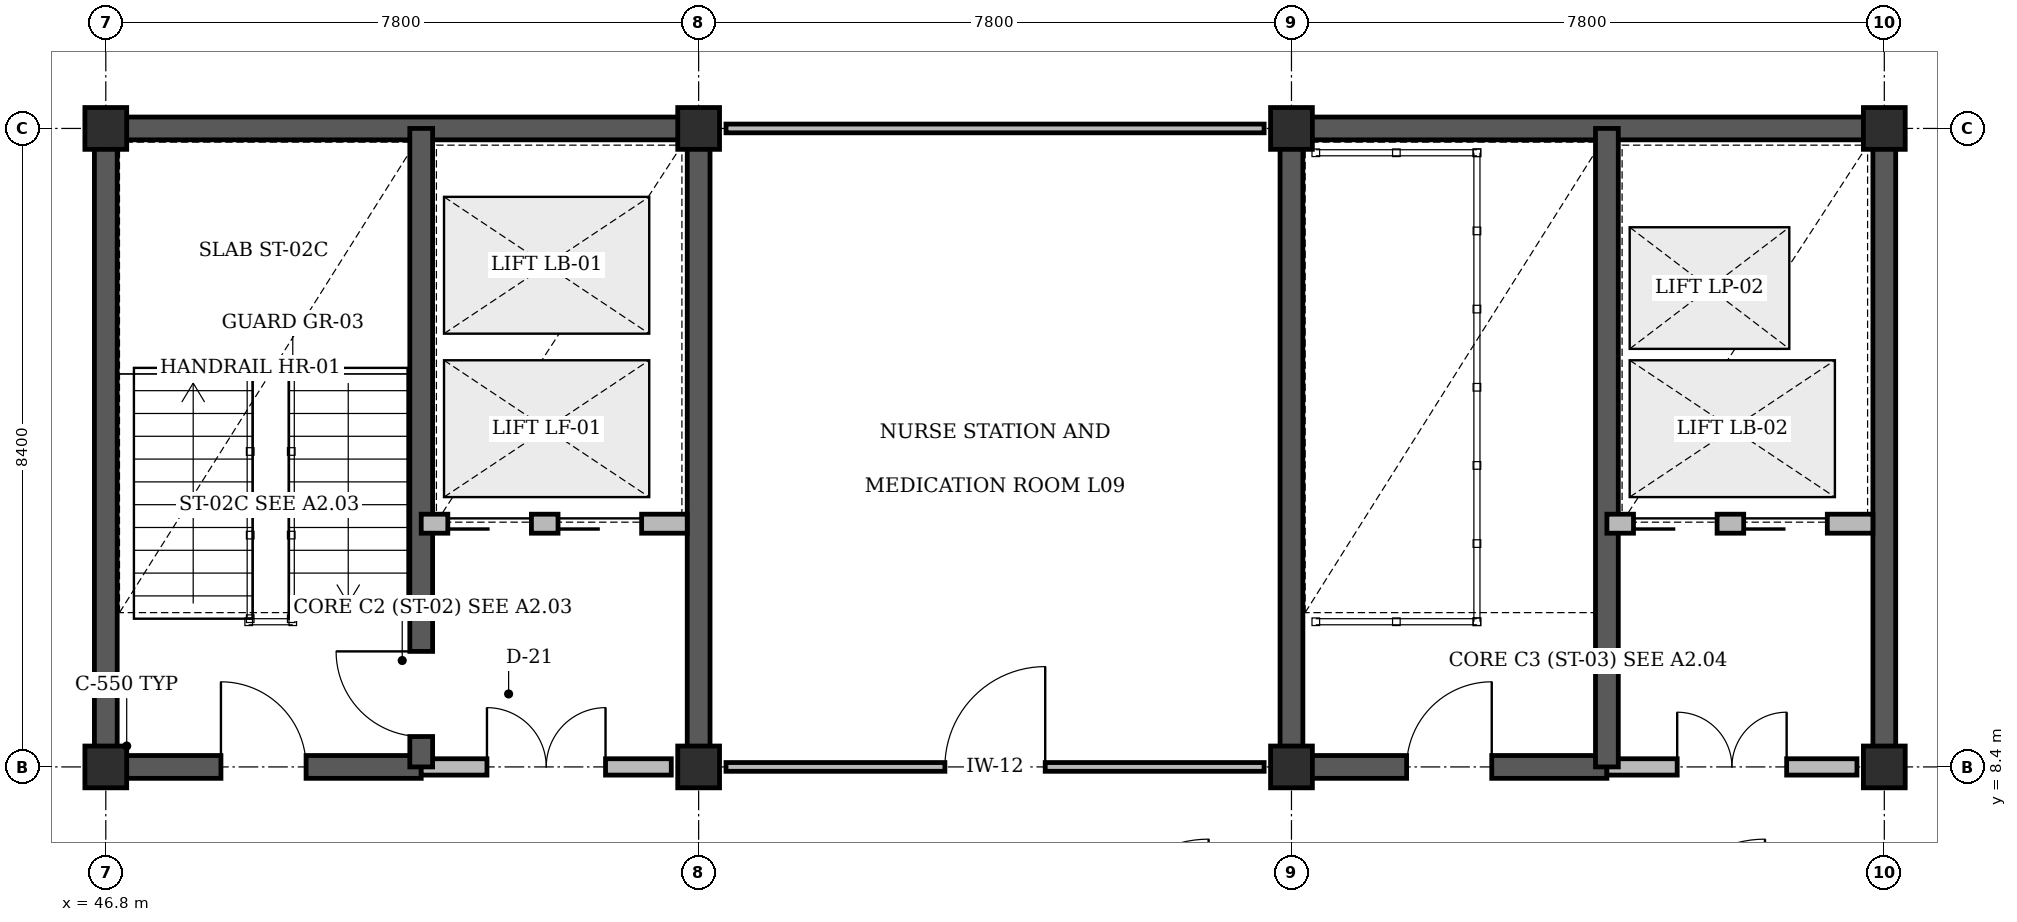
"""IFC4 building model, lengths in metres.
Left out: names, types, materials, properties, quantities, classifications, styles, units other than length and angle.
Written with IfcOpenShell. Run it as: python <this file> out.ifc"""

import sys

from ifc_helpers import new_model, si_unit, direction, frame, frame_2d, origin, origin_2d, place, context, subcontext, project, spatial, rectangle, extrude, element, fill, save


model = new_model("IFC4")
c1 = context("Model", 3, precision=1e-05, world=origin(), true_north=direction((0.0, 1.0)))
c2 = subcontext(c1, "Body", "Model", "MODEL_VIEW")
j1 = project(units=[si_unit("LENGTHUNIT", "METRE"), si_unit("PLANEANGLEUNIT", "RADIAN")], contexts=[c1])
p1 = place(None, origin())
s1 = spatial("IfcSite", under=j1, at=p1, CompositionType="ELEMENT")
p2 = place(p1, origin())
s2 = spatial("IfcBuilding", under=s1, at=p2, CompositionType="ELEMENT")
p3 = place(p2, frame((0.0, 0.0, 39.0)))
s3 = spatial("IfcBuildingStorey", under=s2, at=p3, CompositionType="ELEMENT", Elevation=39.0)
p4 = place(p3, frame((46.65, 16.8, 0.0), z_axis=(0.0, 0.0, 1.0), x_axis=(1.0, 0.0, 0.0)))
e1 = element("IfcWall", 1, at=p4, inside=s3, PredefinedType="SHEAR", context=c2, shape_type="SweptSolid", body=[
    extrude(rectangle(XDim=8.1, YDim=0.3, at=frame_2d((4.05, 0.0))), origin(), (0.0, 0.0, 1.0), 3.92),
])
for number, where, z_axis, x_axis in (
    (2, (46.8, 8.4, 0.0), (0.0, 0.0, 1.0), (0.0, 1.0, 0.0)),
    (3, (54.6, 8.4, 0.0), (0.0, 0.0, 1.0), (0.0, 1.0, 0.0)),
):
    element("IfcWall", number, at=place(p3, frame(where, z_axis=z_axis, x_axis=x_axis)), inside=s3, PredefinedType="SHEAR", context=c2, shape_type="SweptSolid", body=[
        extrude(rectangle(XDim=8.4, YDim=0.3, at=frame_2d((4.2, 0.0))), origin(), (0.0, 0.0, 1.0), 3.92),
    ])
p5 = place(p3, frame((62.25, 16.8, 0.0), z_axis=(0.0, 0.0, 1.0), x_axis=(1.0, 0.0, 0.0)))
e4 = element("IfcWall", 4, at=p5, inside=s3, PredefinedType="SHEAR", context=c2, shape_type="SweptSolid", body=[
    extrude(rectangle(XDim=8.1, YDim=0.3, at=frame_2d((4.05, 0.0))), origin(), (0.0, 0.0, 1.0), 4.2),
])
for number, where, z_axis, x_axis in (
    (5, (62.4, 8.4, 0.0), (0.0, 0.0, 1.0), (0.0, 1.0, 0.0)),
    (6, (70.2, 8.4, 0.0), (0.0, 0.0, 1.0), (0.0, 1.0, 0.0)),
):
    element("IfcWall", number, at=place(p3, frame(where, z_axis=z_axis, x_axis=x_axis)), inside=s3, PredefinedType="SHEAR", context=c2, shape_type="SweptSolid", body=[
        extrude(rectangle(XDim=8.4, YDim=0.3, at=frame_2d((4.2, 0.0))), origin(), (0.0, 0.0, 1.0), 4.2),
    ])
for number, where, z_axis, x_axis in (
    (7, (46.8, 8.4, 0.0), (0.0, 0.0, 1.0), (1.0, 0.0, 0.0)),
    (8, (46.8, 16.8, 0.0), (0.0, 0.0, 1.0), (1.0, 0.0, 0.0)),
    (9, (54.6, 8.4, 0.0), (0.0, 0.0, 1.0), (1.0, 0.0, 0.0)),
    (10, (54.6, 16.8, 0.0), (0.0, 0.0, 1.0), (1.0, 0.0, 0.0)),
    (11, (62.4, 8.4, 0.0), (0.0, 0.0, 1.0), (1.0, 0.0, 0.0)),
    (12, (62.4, 16.8, 0.0), (0.0, 0.0, 1.0), (1.0, 0.0, 0.0)),
    (13, (70.2, 8.4, 0.0), (0.0, 0.0, 1.0), (1.0, 0.0, 0.0)),
    (14, (70.2, 16.8, 0.0), (0.0, 0.0, 1.0), (1.0, 0.0, 0.0)),
):
    element("IfcColumn", number, at=place(p3, frame(where, z_axis=z_axis, x_axis=x_axis)), inside=s3, PredefinedType="COLUMN", context=c2, shape_type="SweptSolid", body=[
        extrude(rectangle(XDim=0.55, YDim=0.55, at=origin_2d()), origin(), (0.0, 0.0, 1.0), 4.2),
    ])
p6 = place(p3, frame((46.8, 8.4, 0.0), z_axis=(0.0, 0.0, 1.0), x_axis=(1.0, 0.0, 0.0)))
e15 = element("IfcWall", 15, at=p6, inside=s3, PredefinedType="SHEAR", context=c2, shape_type="SweptSolid", body=[
    extrude(rectangle(XDim=4.15, YDim=0.3, at=frame_2d((2.075, 0.0))), origin(), (0.0, 0.0, 1.0), 4.2),
])
p7 = place(p6, frame((1.515, 0.0, 0.0)))
e16 = element("IfcOpeningElement", 16, at=p7, cuts=e15, PredefinedType="OPENING", context=c2, shape_type="SweptSolid", body=[
    extrude(rectangle(XDim=1.12, YDim=2.15, at=frame_2d((0.56, 1.075))), frame((0.0, 0.16, 0.0), z_axis=(0.0, -1.0, 0.0), x_axis=(1.0, 0.0, 0.0)), (0.0, 0.0, 1.0), 0.32),
])
p8 = place(p3, frame((50.95, 8.4, 0.0), z_axis=(0.0, 0.0, 1.0), x_axis=(1.0, 0.0, 0.0)))
e17 = element("IfcWall", 17, at=p8, inside=s3, PredefinedType="STANDARD", context=c2, shape_type="SweptSolid", body=[
    extrude(rectangle(XDim=3.29, YDim=0.215, at=frame_2d((1.645, 0.0))), origin(), (0.0, 0.0, 1.0), 3.37),
])
p9 = place(p8, frame((0.865, 0.0, 0.0)))
e18 = element("IfcOpeningElement", 18, at=p9, cuts=e17, PredefinedType="OPENING", context=c2, shape_type="SweptSolid", body=[
    extrude(rectangle(XDim=1.56, YDim=2.2, at=frame_2d((0.78, 1.1))), frame((0.0, 0.118, 0.0), z_axis=(0.0, -1.0, 0.0), x_axis=(1.0, 0.0, 0.0)), (0.0, 0.0, 1.0), 0.235),
])
p10 = place(p3, frame((50.95, 8.4, 0.0), z_axis=(0.0, 0.0, 1.0), x_axis=(0.0, 1.0, 0.0)))
e19 = element("IfcWall", 19, at=p10, inside=s3, PredefinedType="SHEAR", context=c2, shape_type="SweptSolid", body=[
    extrude(rectangle(XDim=8.4, YDim=0.3, at=frame_2d((4.2, 0.0))), origin(), (0.0, 0.0, 1.0), 4.2),
])
p11 = place(p10, frame((0.4, 0.0, 0.0)))
e20 = element("IfcOpeningElement", 20, at=p11, cuts=e19, PredefinedType="OPENING", context=c2, shape_type="SweptSolid", body=[
    extrude(rectangle(XDim=1.12, YDim=2.15, at=frame_2d((0.56, 1.075))), frame((0.0, 0.16, 0.0), z_axis=(0.0, -1.0, 0.0), x_axis=(1.0, 0.0, 0.0)), (0.0, 0.0, 1.0), 0.32),
])
p12 = place(p3, frame((50.95, 11.6, 0.0), z_axis=(0.0, 0.0, 1.0), x_axis=(1.0, 0.0, 0.0)))
e21 = element("IfcWall", 21, at=p12, inside=s3, PredefinedType="STANDARD", context=c2, shape_type="SweptSolid", body=[
    extrude(rectangle(XDim=3.5, YDim=0.25, at=frame_2d((1.75, 0.0))), origin(), (0.0, 0.0, 1.0), 3.9),
])
p13 = place(p12, frame((0.35, 0.0, 0.0)))
e22 = element("IfcOpeningElement", 22, at=p13, cuts=e21, PredefinedType="OPENING", context=c2, shape_type="SweptSolid", body=[
    extrude(rectangle(XDim=1.1, YDim=2.2, at=frame_2d((0.55, 1.1))), frame((0.0, 0.135, 0.0), z_axis=(0.0, -1.0, 0.0), x_axis=(1.0, 0.0, 0.0)), (0.0, 0.0, 1.0), 0.27),
])
p14 = place(p12, frame((1.8, 0.0, 0.0)))
e23 = element("IfcOpeningElement", 23, at=p14, cuts=e21, PredefinedType="OPENING", context=c2, shape_type="SweptSolid", body=[
    extrude(rectangle(XDim=1.1, YDim=2.2, at=frame_2d((0.55, 1.1))), frame((0.0, 0.135, 0.0), z_axis=(0.0, -1.0, 0.0), x_axis=(1.0, 0.0, 0.0)), (0.0, 0.0, 1.0), 0.27),
])
p15 = place(p3, frame((62.4, 8.4, 0.0), z_axis=(0.0, 0.0, 1.0), x_axis=(1.0, 0.0, 0.0)))
e24 = element("IfcWall", 24, at=p15, inside=s3, PredefinedType="SHEAR", context=c2, shape_type="SweptSolid", body=[
    extrude(rectangle(XDim=4.15, YDim=0.3, at=frame_2d((2.075, 0.0))), origin(), (0.0, 0.0, 1.0), 4.2),
])
p16 = place(p15, frame((1.515, 0.0, 0.0)))
e25 = element("IfcOpeningElement", 25, at=p16, cuts=e24, PredefinedType="OPENING", context=c2, shape_type="SweptSolid", body=[
    extrude(rectangle(XDim=1.12, YDim=2.15, at=frame_2d((0.56, 1.075))), frame((0.0, 0.16, 0.0), z_axis=(0.0, -1.0, 0.0), x_axis=(1.0, 0.0, 0.0)), (0.0, 0.0, 1.0), 0.32),
])
p17 = place(p3, frame((66.55, 8.4, 0.0), z_axis=(0.0, 0.0, 1.0), x_axis=(1.0, 0.0, 0.0)))
e26 = element("IfcWall", 26, at=p17, inside=s3, PredefinedType="STANDARD", context=c2, shape_type="SweptSolid", body=[
    extrude(rectangle(XDim=3.29, YDim=0.215, at=frame_2d((1.645, 0.0))), origin(), (0.0, 0.0, 1.0), 3.37),
])
p18 = place(p17, frame((0.925, 0.0, 0.0)))
e27 = element("IfcOpeningElement", 27, at=p18, cuts=e26, PredefinedType="OPENING", context=c2, shape_type="SweptSolid", body=[
    extrude(rectangle(XDim=1.44, YDim=2.2, at=frame_2d((0.72, 1.1))), frame((0.0, 0.118, 0.0), z_axis=(0.0, -1.0, 0.0), x_axis=(1.0, 0.0, 0.0)), (0.0, 0.0, 1.0), 0.235),
])
p19 = place(p3, frame((66.55, 8.4, 0.0), z_axis=(0.0, 0.0, 1.0), x_axis=(0.0, 1.0, 0.0)))
e28 = element("IfcWall", 28, at=p19, inside=s3, PredefinedType="SHEAR", context=c2, shape_type="SweptSolid", body=[
    extrude(rectangle(XDim=8.4, YDim=0.3, at=frame_2d((4.2, 0.0))), origin(), (0.0, 0.0, 1.0), 4.2),
])
p20 = place(p3, frame((66.55, 11.6, 0.0), z_axis=(0.0, 0.0, 1.0), x_axis=(1.0, 0.0, 0.0)))
e29 = element("IfcWall", 29, at=p20, inside=s3, PredefinedType="STANDARD", context=c2, shape_type="SweptSolid", body=[
    extrude(rectangle(XDim=3.5, YDim=0.25, at=frame_2d((1.75, 0.0))), origin(), (0.0, 0.0, 1.0), 3.9),
])
p21 = place(p20, frame((0.35, 0.0, 0.0)))
e30 = element("IfcOpeningElement", 30, at=p21, cuts=e29, PredefinedType="OPENING", context=c2, shape_type="SweptSolid", body=[
    extrude(rectangle(XDim=1.1, YDim=2.2, at=frame_2d((0.55, 1.1))), frame((0.0, 0.135, 0.0), z_axis=(0.0, -1.0, 0.0), x_axis=(1.0, 0.0, 0.0)), (0.0, 0.0, 1.0), 0.27),
])
p22 = place(p20, frame((1.8, 0.0, 0.0)))
e31 = element("IfcOpeningElement", 31, at=p22, cuts=e29, PredefinedType="OPENING", context=c2, shape_type="SweptSolid", body=[
    extrude(rectangle(XDim=1.1, YDim=2.2, at=frame_2d((0.55, 1.1))), frame((0.0, 0.135, 0.0), z_axis=(0.0, -1.0, 0.0), x_axis=(1.0, 0.0, 0.0)), (0.0, 0.0, 1.0), 0.27),
])
p23 = place(p3, frame((54.96, 8.4, 0.0), z_axis=(0.0, 0.0, 1.0), x_axis=(1.0, 0.0, 0.0)))
e32 = element("IfcWall", 32, at=p23, inside=s3, PredefinedType="PARTITIONING", context=c2, shape_type="SweptSolid", body=[
    extrude(rectangle(XDim=7.08, YDim=0.115, at=frame_2d((3.54, 0.0))), origin(), (0.0, 0.0, 1.0), 3.37),
])
p24 = place(p23, frame((2.88, 0.0, 0.0)))
e33 = element("IfcOpeningElement", 33, at=p24, cuts=e32, PredefinedType="OPENING", context=c2, shape_type="SweptSolid", body=[
    extrude(rectangle(XDim=1.32, YDim=2.15, at=frame_2d((0.66, 1.075))), frame((0.0, 0.067, 0.0), z_axis=(0.0, -1.0, 0.0), x_axis=(1.0, 0.0, 0.0)), (0.0, 0.0, 1.0), 0.135),
])
p25 = place(p3, frame((54.96, 16.8, 0.0), z_axis=(0.0, 0.0, 1.0), x_axis=(1.0, 0.0, 0.0)))
e34 = element("IfcWall", 34, at=p25, inside=s3, PredefinedType="PARTITIONING", context=c2, shape_type="SweptSolid", body=[
    extrude(rectangle(XDim=7.08, YDim=0.115, at=frame_2d((3.54, 0.0))), origin(), (0.0, 0.0, 1.0), 3.37),
])
p26 = place(p7, origin())
e35 = element("IfcDoor", 35, at=p26, inside=s3, OperationType="SINGLE_SWING_LEFT", PredefinedType="DOOR", context=c2, shape_type="SweptSolid", body=[
    extrude(rectangle(XDim=1.12, YDim=2.15, at=frame_2d((0.56, 1.075))), frame((0.0, 0.025, 0.0), z_axis=(0.0, -1.0, 0.0), x_axis=(1.0, 0.0, 0.0)), (0.0, 0.0, 1.0), 0.05),
])
fill(e16, e35)
p27 = place(p9, origin())
e36 = element("IfcDoor", 36, at=p27, inside=s3, OperationType="DOUBLE_DOOR_SINGLE_SWING", PredefinedType="DOOR", context=c2, shape_type="SweptSolid", body=[
    extrude(rectangle(XDim=1.56, YDim=2.2, at=frame_2d((0.78, 1.1))), frame((0.0, 0.025, 0.0), z_axis=(0.0, -1.0, 0.0), x_axis=(1.0, 0.0, 0.0)), (0.0, 0.0, 1.0), 0.05),
])
fill(e18, e36)
p28 = place(p11, origin())
e37 = element("IfcDoor", 37, at=p28, inside=s3, OperationType="SINGLE_SWING_RIGHT", PredefinedType="DOOR", context=c2, shape_type="SweptSolid", body=[
    extrude(rectangle(XDim=1.12, YDim=2.15, at=frame_2d((0.56, 1.075))), frame((0.0, 0.025, 0.0), z_axis=(0.0, -1.0, 0.0), x_axis=(1.0, 0.0, 0.0)), (0.0, 0.0, 1.0), 0.05),
])
fill(e20, e37)
p29 = place(p13, origin())
e38 = element("IfcDoor", 38, at=p29, inside=s3, OperationType="SLIDING_TO_LEFT", PredefinedType="DOOR", context=c2, shape_type="SweptSolid", body=[
    extrude(rectangle(XDim=1.1, YDim=2.2, at=frame_2d((0.55, 1.1))), frame((0.0, 0.025, 0.0), z_axis=(0.0, -1.0, 0.0), x_axis=(1.0, 0.0, 0.0)), (0.0, 0.0, 1.0), 0.05),
])
fill(e22, e38)
p30 = place(p14, origin())
e39 = element("IfcDoor", 39, at=p30, inside=s3, OperationType="SLIDING_TO_LEFT", PredefinedType="DOOR", context=c2, shape_type="SweptSolid", body=[
    extrude(rectangle(XDim=1.1, YDim=2.2, at=frame_2d((0.55, 1.1))), frame((0.0, 0.025, 0.0), z_axis=(0.0, -1.0, 0.0), x_axis=(1.0, 0.0, 0.0)), (0.0, 0.0, 1.0), 0.05),
])
fill(e23, e39)
p31 = place(p16, origin())
e40 = element("IfcDoor", 40, at=p31, inside=s3, OperationType="SINGLE_SWING_RIGHT", PredefinedType="DOOR", context=c2, shape_type="SweptSolid", body=[
    extrude(rectangle(XDim=1.12, YDim=2.15, at=frame_2d((0.56, 1.075))), frame((0.0, 0.025, 0.0), z_axis=(0.0, -1.0, 0.0), x_axis=(1.0, 0.0, 0.0)), (0.0, 0.0, 1.0), 0.05),
])
fill(e25, e40)
p32 = place(p18, origin())
e41 = element("IfcDoor", 41, at=p32, inside=s3, OperationType="DOUBLE_DOOR_SINGLE_SWING", PredefinedType="DOOR", context=c2, shape_type="SweptSolid", body=[
    extrude(rectangle(XDim=1.44, YDim=2.2, at=frame_2d((0.72, 1.1))), frame((0.0, 0.025, 0.0), z_axis=(0.0, -1.0, 0.0), x_axis=(1.0, 0.0, 0.0)), (0.0, 0.0, 1.0), 0.05),
])
fill(e27, e41)
p33 = place(p21, origin())
e42 = element("IfcDoor", 42, at=p33, inside=s3, OperationType="SLIDING_TO_LEFT", PredefinedType="DOOR", context=c2, shape_type="SweptSolid", body=[
    extrude(rectangle(XDim=1.1, YDim=2.2, at=frame_2d((0.55, 1.1))), frame((0.0, 0.025, 0.0), z_axis=(0.0, -1.0, 0.0), x_axis=(1.0, 0.0, 0.0)), (0.0, 0.0, 1.0), 0.05),
])
fill(e30, e42)
p34 = place(p22, origin())
e43 = element("IfcDoor", 43, at=p34, inside=s3, OperationType="SLIDING_TO_LEFT", PredefinedType="DOOR", context=c2, shape_type="SweptSolid", body=[
    extrude(rectangle(XDim=1.1, YDim=2.2, at=frame_2d((0.55, 1.1))), frame((0.0, 0.025, 0.0), z_axis=(0.0, -1.0, 0.0), x_axis=(1.0, 0.0, 0.0)), (0.0, 0.0, 1.0), 0.05),
])
fill(e31, e43)
p35 = place(p24, origin())
e44 = element("IfcDoor", 44, at=p35, inside=s3, OperationType="SINGLE_SWING_RIGHT", PredefinedType="DOOR", context=c2, shape_type="SweptSolid", body=[
    extrude(rectangle(XDim=1.32, YDim=2.15, at=frame_2d((0.66, 1.075))), frame((0.0, 0.025, 0.0), z_axis=(0.0, -1.0, 0.0), x_axis=(1.0, 0.0, 0.0)), (0.0, 0.0, 1.0), 0.05),
])
fill(e33, e44)
save(model, sys.argv[1])
